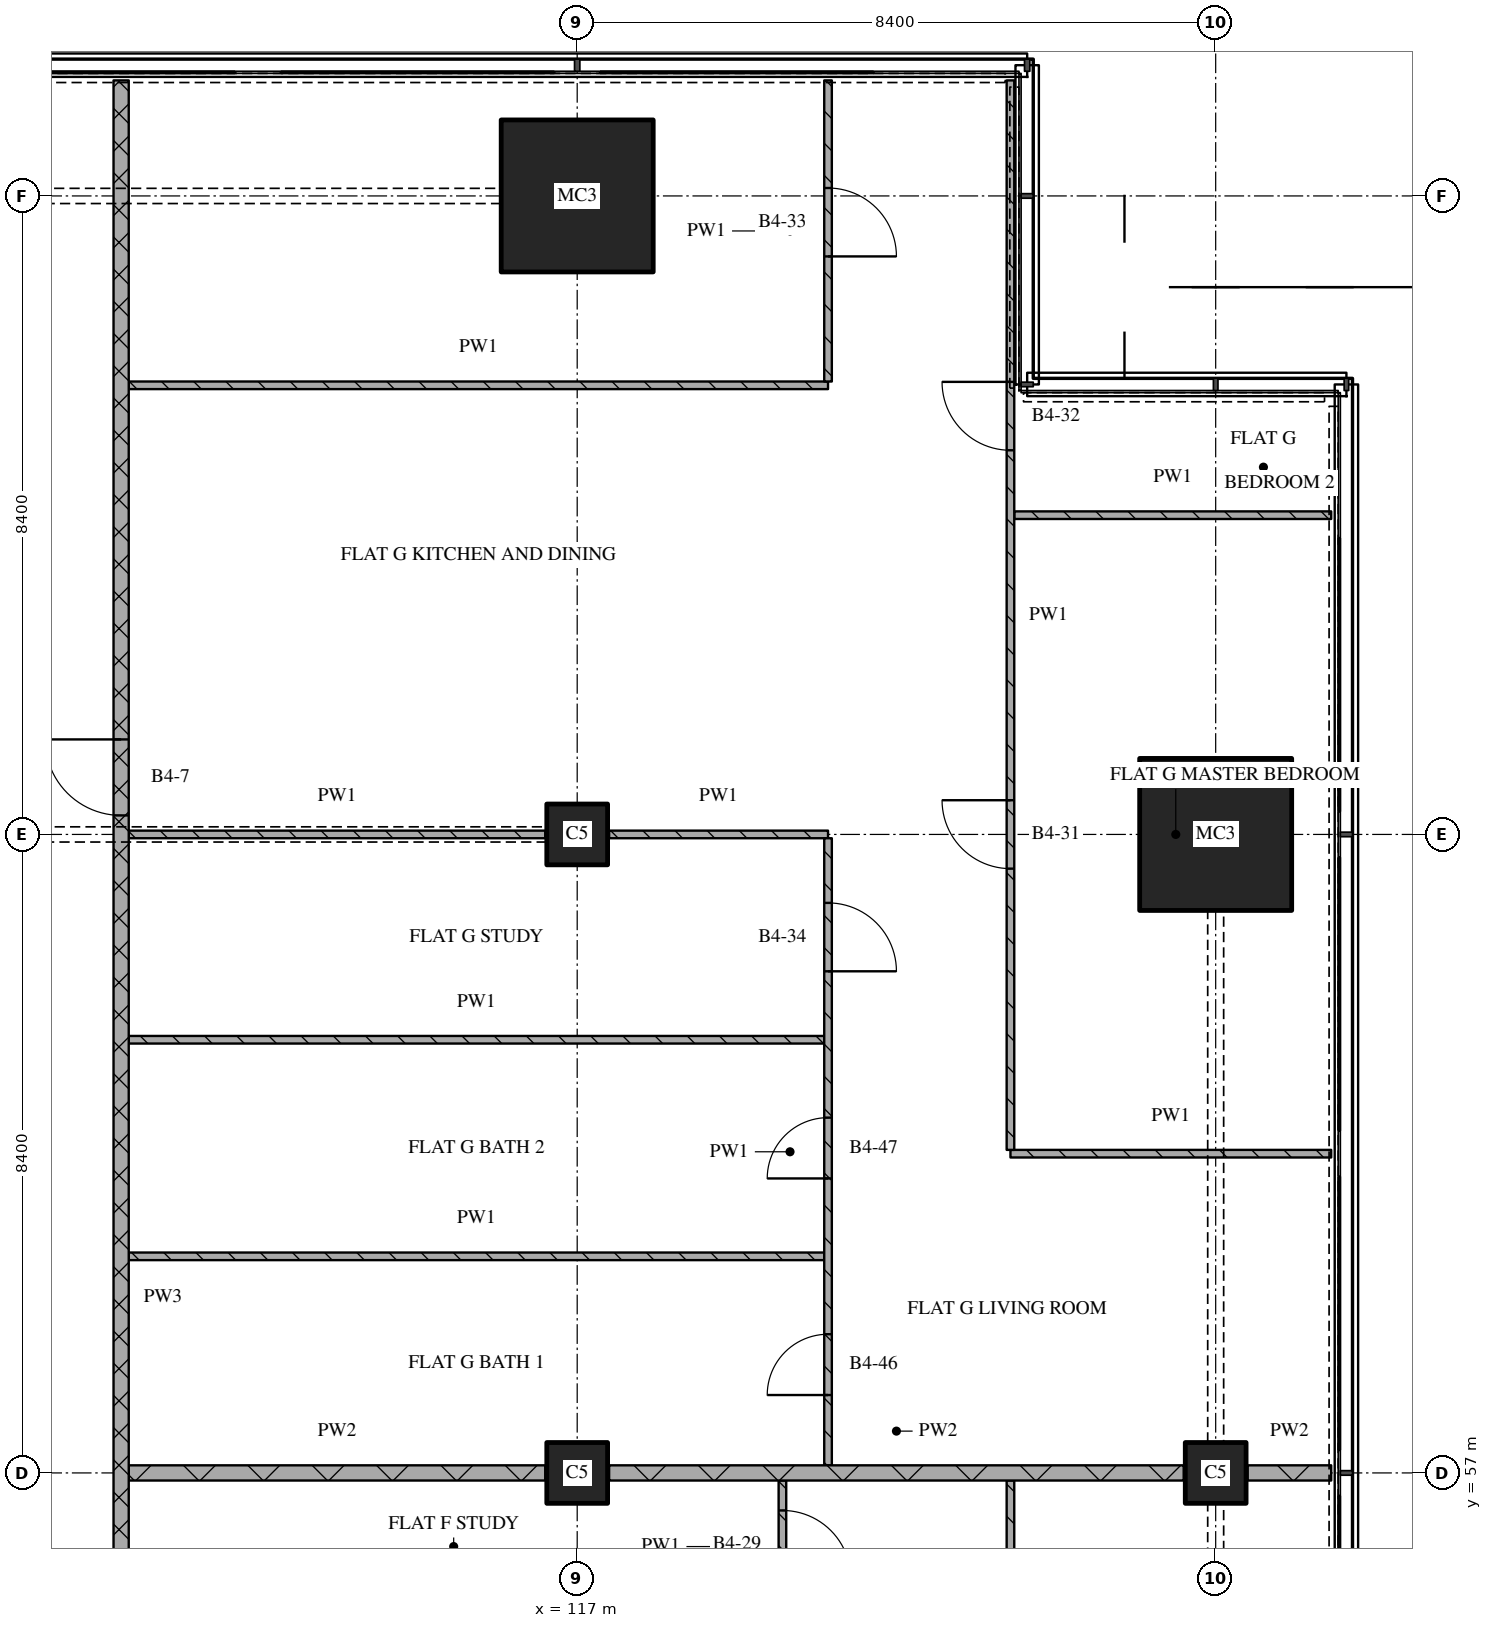
"""IFC4 building model, lengths in metres.
Left out: names, types, materials, properties, quantities, classifications, styles, units other than length and angle.
Written with IfcOpenShell. Run it as: python <this file> out.ifc"""

import sys

from ifc_helpers import new_model, si_unit, direction, frame, frame_2d, origin, origin_2d, place, context, subcontext, project, spatial, rectangle, extrude, element, fill, save


model = new_model("IFC4")
c1 = context("Model", 3, precision=1e-05, world=origin(), true_north=direction((0.0, 1.0)))
c2 = subcontext(c1, "Body", "Model", "MODEL_VIEW")
j1 = project(units=[si_unit("LENGTHUNIT", "METRE"), si_unit("PLANEANGLEUNIT", "RADIAN")], contexts=[c1])
p1 = place(None, origin())
s1 = spatial("IfcSite", under=j1, at=p1, CompositionType="ELEMENT")
p2 = place(p1, origin())
s2 = spatial("IfcBuilding", under=s1, at=p2, CompositionType="ELEMENT")
p3 = place(p2, frame((0.0, 0.0, 134.85)))
s3 = spatial("IfcBuildingStorey", under=s2, at=p3, CompositionType="ELEMENT", Elevation=134.85)
for number, where, z_axis, x_axis in (
    (1, (117.0, 57.0, 0.0), (0.0, 0.0, 1.0), (1.0, 0.0, 0.0)),
    (2, (117.0, 65.4, 0.0), (0.0, 0.0, 1.0), (1.0, 0.0, 0.0)),
):
    element("IfcColumn", number, at=place(p3, frame(where, z_axis=z_axis, x_axis=x_axis)), inside=s3, PredefinedType="COLUMN", context=c2, shape_type="SweptSolid", body=[
        extrude(rectangle(XDim=0.8, YDim=0.8, at=origin_2d()), origin(), (0.0, 0.0, 1.0), 3.6),
    ])
p4 = place(p3, frame((117.0, 73.8, 0.0), z_axis=(0.0, 0.0, 1.0), x_axis=(1.0, 0.0, 0.0)))
e3 = element("IfcColumn", 3, at=p4, inside=s3, PredefinedType="COLUMN", context=c2, shape_type="SweptSolid", body=[
    extrude(rectangle(XDim=2.0, YDim=2.0, at=origin_2d()), origin(), (0.0, 0.0, 1.0), 3.6),
])
p5 = place(p3, frame((125.4, 57.0, 0.0), z_axis=(0.0, 0.0, 1.0), x_axis=(1.0, 0.0, 0.0)))
e4 = element("IfcColumn", 4, at=p5, inside=s3, PredefinedType="COLUMN", context=c2, shape_type="SweptSolid", body=[
    extrude(rectangle(XDim=0.8, YDim=0.8, at=origin_2d()), origin(), (0.0, 0.0, 1.0), 3.6),
])
p6 = place(p3, frame((125.4, 65.4, 0.0), z_axis=(0.0, 0.0, 1.0), x_axis=(1.0, 0.0, 0.0)))
e5 = element("IfcColumn", 5, at=p6, inside=s3, PredefinedType="COLUMN", context=c2, shape_type="SweptSolid", body=[
    extrude(rectangle(XDim=2.0, YDim=2.0, at=origin_2d()), origin(), (0.0, 0.0, 1.0), 3.6),
])
p7 = place(p3, frame((111.1, 57.0, 0.0), z_axis=(0.0, 0.0, 1.0), x_axis=(1.0, 0.0, 0.0)))
e6 = element("IfcWall", 6, at=p7, inside=s3, PredefinedType="PARTITIONING", context=c2, shape_type="SweptSolid", body=[
    extrude(rectangle(XDim=5.48, YDim=0.2, at=frame_2d((2.74, 0.0))), origin(), (0.0, 0.0, 1.0), 3.32),
])
p8 = place(p3, frame((117.42, 57.0, 0.0), z_axis=(0.0, 0.0, 1.0), x_axis=(1.0, 0.0, 0.0)))
e7 = element("IfcWall", 7, at=p8, inside=s3, PredefinedType="PARTITIONING", context=c2, shape_type="SweptSolid", body=[
    extrude(rectangle(XDim=7.56, YDim=0.2, at=frame_2d((3.78, 0.0))), origin(), (0.0, 0.0, 1.0), 3.32),
])
p9 = place(p3, frame((125.82, 57.0, 0.0), z_axis=(0.0, 0.0, 1.0), x_axis=(1.0, 0.0, 0.0)))
e8 = element("IfcWall", 8, at=p9, inside=s3, PredefinedType="PARTITIONING", context=c2, shape_type="SweptSolid", body=[
    extrude(rectangle(XDim=1.1, YDim=0.2, at=frame_2d((0.55, 0.0))), origin(), (0.0, 0.0, 1.0), 3.32),
])
p10 = place(p3, frame((111.1, 59.85, 0.0), z_axis=(0.0, 0.0, 1.0), x_axis=(1.0, 0.0, 0.0)))
e9 = element("IfcWall", 9, at=p10, inside=s3, PredefinedType="PARTITIONING", context=c2, shape_type="SweptSolid", body=[
    extrude(rectangle(XDim=9.15, YDim=0.1, at=frame_2d((4.575, 0.0))), origin(), (0.0, 0.0, 1.0), 3.32),
])
p11 = place(p3, frame((122.7, 61.2, 0.0), z_axis=(0.0, 0.0, 1.0), x_axis=(1.0, 0.0, 0.0)))
e10 = element("IfcWall", 10, at=p11, inside=s3, PredefinedType="PARTITIONING", context=c2, shape_type="SweptSolid", body=[
    extrude(rectangle(XDim=4.22, YDim=0.1, at=frame_2d((2.11, 0.0))), origin(), (0.0, 0.0, 1.0), 3.32),
])
p12 = place(p3, frame((111.1, 62.699, 0.0), z_axis=(0.0, 0.0, 1.0), x_axis=(1.0, 0.0, 0.0)))
e11 = element("IfcWall", 11, at=p12, inside=s3, PredefinedType="PARTITIONING", context=c2, shape_type="SweptSolid", body=[
    extrude(rectangle(XDim=9.15, YDim=0.1, at=frame_2d((4.575, 0.0))), origin(), (0.0, 0.0, 1.0), 3.32),
])
p13 = place(p3, frame((111.1, 65.4, 0.0), z_axis=(0.0, 0.0, 1.0), x_axis=(1.0, 0.0, 0.0)))
e12 = element("IfcWall", 12, at=p13, inside=s3, PredefinedType="PARTITIONING", context=c2, shape_type="SweptSolid", body=[
    extrude(rectangle(XDim=5.48, YDim=0.1, at=frame_2d((2.74, 0.0))), origin(), (0.0, 0.0, 1.0), 2.82),
])
p14 = place(p3, frame((117.42, 65.4, 0.0), z_axis=(0.0, 0.0, 1.0), x_axis=(1.0, 0.0, 0.0)))
e13 = element("IfcWall", 13, at=p14, inside=s3, PredefinedType="PARTITIONING", context=c2, shape_type="SweptSolid", body=[
    extrude(rectangle(XDim=2.88, YDim=0.1, at=frame_2d((1.44, 0.0))), origin(), (0.0, 0.0, 1.0), 3.32),
])
p15 = place(p3, frame((122.75, 69.6, 0.0), z_axis=(0.0, 0.0, 1.0), x_axis=(1.0, 0.0, 0.0)))
e14 = element("IfcWall", 14, at=p15, inside=s3, PredefinedType="PARTITIONING", context=c2, shape_type="SweptSolid", body=[
    extrude(rectangle(XDim=4.17, YDim=0.1, at=frame_2d((2.085, 0.0))), origin(), (0.0, 0.0, 1.0), 3.32),
])
p16 = place(p3, frame((111.1, 71.309, 0.0), z_axis=(0.0, 0.0, 1.0), x_axis=(1.0, 0.0, 0.0)))
e15 = element("IfcWall", 15, at=p16, inside=s3, PredefinedType="PARTITIONING", context=c2, shape_type="SweptSolid", body=[
    extrude(rectangle(XDim=9.2, YDim=0.1, at=frame_2d((4.6, 0.0))), origin(), (0.0, 0.0, 1.0), 3.32),
])
p17 = place(p3, frame((111.0, 75.32, 0.0), z_axis=(0.0, 0.0, 1.0), x_axis=(0.0, -1.0, 0.0)))
e16 = element("IfcWall", 16, at=p17, inside=s3, PredefinedType="PARTITIONING", context=c2, shape_type="SweptSolid", body=[
    extrude(rectangle(XDim=32.02, YDim=0.2, at=frame_2d((16.01, 0.0))), origin(), (0.0, 0.0, 1.0), 3.32),
])
p18 = place(p17, frame((8.67, 0.0, 0.0)))
e17 = element("IfcOpeningElement", 17, at=p18, cuts=e16, PredefinedType="OPENING", context=c2, shape_type="SweptSolid", body=[
    extrude(rectangle(XDim=1.0, YDim=2.1, at=frame_2d((0.5, 1.05))), frame((0.0, 0.11, 0.0), z_axis=(0.0, -1.0, 0.0), x_axis=(1.0, 0.0, 0.0)), (0.0, 0.0, 1.0), 0.22),
])
p19 = place(p17, frame((25.17, 0.0, 0.0)))
e18 = element("IfcOpeningElement", 18, at=p19, cuts=e16, PredefinedType="OPENING", context=c2, shape_type="SweptSolid", body=[
    extrude(rectangle(XDim=1.0, YDim=2.1, at=frame_2d((0.5, 1.05))), frame((0.0, 0.11, 0.0), z_axis=(0.0, -1.0, 0.0), x_axis=(1.0, 0.0, 0.0)), (0.0, 0.0, 1.0), 0.22),
])
p20 = place(p3, frame((119.7, 55.163, 0.0), z_axis=(0.0, 0.0, 1.0), x_axis=(0.0, 1.0, 0.0)))
e19 = element("IfcWall", 19, at=p20, inside=s3, PredefinedType="PARTITIONING", context=c2, shape_type="SweptSolid", body=[
    extrude(rectangle(XDim=1.737, YDim=0.1, at=frame_2d((0.869, 0.0))), origin(), (0.0, 0.0, 1.0), 3.32),
])
p21 = place(p20, frame((0.444, 0.0, 0.0)))
e20 = element("IfcOpeningElement", 20, at=p21, cuts=e19, PredefinedType="OPENING", context=c2, shape_type="SweptSolid", body=[
    extrude(rectangle(XDim=0.9, YDim=2.1, at=frame_2d((0.45, 1.05))), frame((0.0, 0.06, 0.0), z_axis=(0.0, -1.0, 0.0), x_axis=(1.0, 0.0, 0.0)), (0.0, 0.0, 1.0), 0.12),
])
p22 = place(p3, frame((120.3, 57.1, 0.0), z_axis=(0.0, 0.0, 1.0), x_axis=(0.0, 1.0, 0.0)))
e21 = element("IfcWall", 21, at=p22, inside=s3, PredefinedType="PARTITIONING", context=c2, shape_type="SweptSolid", body=[
    extrude(rectangle(XDim=8.25, YDim=0.1, at=frame_2d((4.125, 0.0))), origin(), (0.0, 0.0, 1.0), 3.32),
])
p23 = place(p22, frame((0.925, 0.0, 0.0)))
e22 = element("IfcOpeningElement", 22, at=p23, cuts=e21, PredefinedType="OPENING", context=c2, shape_type="SweptSolid", body=[
    extrude(rectangle(XDim=0.8, YDim=2.1, at=frame_2d((0.4, 1.05))), frame((0.0, 0.06, 0.0), z_axis=(0.0, -1.0, 0.0), x_axis=(1.0, 0.0, 0.0)), (0.0, 0.0, 1.0), 0.12),
])
p24 = place(p22, frame((3.774, 0.0, 0.0)))
e23 = element("IfcOpeningElement", 23, at=p24, cuts=e21, PredefinedType="OPENING", context=c2, shape_type="SweptSolid", body=[
    extrude(rectangle(XDim=0.8, YDim=2.1, at=frame_2d((0.4, 1.05))), frame((0.0, 0.06, 0.0), z_axis=(0.0, -1.0, 0.0), x_axis=(1.0, 0.0, 0.0)), (0.0, 0.0, 1.0), 0.12),
])
p25 = place(p22, frame((6.5, 0.0, 0.0)))
e24 = element("IfcOpeningElement", 24, at=p25, cuts=e21, PredefinedType="OPENING", context=c2, shape_type="SweptSolid", body=[
    extrude(rectangle(XDim=0.9, YDim=2.1, at=frame_2d((0.45, 1.05))), frame((0.0, 0.06, 0.0), z_axis=(0.0, -1.0, 0.0), x_axis=(1.0, 0.0, 0.0)), (0.0, 0.0, 1.0), 0.12),
])
p26 = place(p3, frame((120.3, 71.359, 0.0), z_axis=(0.0, 0.0, 1.0), x_axis=(0.0, 1.0, 0.0)))
e25 = element("IfcWall", 25, at=p26, inside=s3, PredefinedType="PARTITIONING", context=c2, shape_type="SweptSolid", body=[
    extrude(rectangle(XDim=3.961, YDim=0.1, at=frame_2d((1.981, 0.0))), origin(), (0.0, 0.0, 1.0), 3.32),
])
p27 = place(p26, frame((1.646, 0.0, 0.0)))
e26 = element("IfcOpeningElement", 26, at=p27, cuts=e25, PredefinedType="OPENING", context=c2, shape_type="SweptSolid", body=[
    extrude(rectangle(XDim=0.9, YDim=2.1, at=frame_2d((0.45, 1.05))), frame((0.0, 0.06, 0.0), z_axis=(0.0, -1.0, 0.0), x_axis=(1.0, 0.0, 0.0)), (0.0, 0.0, 1.0), 0.12),
])
p28 = place(p3, frame((122.7, 56.9, 0.0), z_axis=(0.0, 0.0, 1.0), x_axis=(0.0, -1.0, 0.0)))
e27 = element("IfcWall", 27, at=p28, inside=s3, PredefinedType="PARTITIONING", context=c2, shape_type="SweptSolid", body=[
    extrude(rectangle(XDim=8.25, YDim=0.1, at=frame_2d((4.125, 0.0))), origin(), (0.0, 0.0, 1.0), 3.32),
])
p29 = place(p28, frame((3.65, 0.0, 0.0)))
e28 = element("IfcOpeningElement", 28, at=p29, cuts=e27, PredefinedType="OPENING", context=c2, shape_type="SweptSolid", body=[
    extrude(rectangle(XDim=0.9, YDim=2.1, at=frame_2d((0.45, 1.05))), frame((0.0, 0.06, 0.0), z_axis=(0.0, -1.0, 0.0), x_axis=(1.0, 0.0, 0.0)), (0.0, 0.0, 1.0), 0.12),
])
p30 = place(p3, frame((122.7, 75.32, 0.0), z_axis=(0.0, 0.0, 1.0), x_axis=(0.0, -1.0, 0.0)))
e29 = element("IfcWall", 29, at=p30, inside=s3, PredefinedType="PARTITIONING", context=c2, shape_type="SweptSolid", body=[
    extrude(rectangle(XDim=14.07, YDim=0.1, at=frame_2d((7.035, 0.0))), origin(), (0.0, 0.0, 1.0), 3.32),
])
p31 = place(p30, frame((3.966, 0.0, 0.0)))
e30 = element("IfcOpeningElement", 30, at=p31, cuts=e29, PredefinedType="OPENING", context=c2, shape_type="SweptSolid", body=[
    extrude(rectangle(XDim=0.9, YDim=2.1, at=frame_2d((0.45, 1.05))), frame((0.0, 0.06, 0.0), z_axis=(0.0, -1.0, 0.0), x_axis=(1.0, 0.0, 0.0)), (0.0, 0.0, 1.0), 0.12),
])
p32 = place(p30, frame((9.47, 0.0, 0.0)))
e31 = element("IfcOpeningElement", 31, at=p32, cuts=e29, PredefinedType="OPENING", context=c2, shape_type="SweptSolid", body=[
    extrude(rectangle(XDim=0.9, YDim=2.1, at=frame_2d((0.45, 1.05))), frame((0.0, 0.06, 0.0), z_axis=(0.0, -1.0, 0.0), x_axis=(1.0, 0.0, 0.0)), (0.0, 0.0, 1.0), 0.12),
])
p33 = place(p18, origin())
e32 = element("IfcDoor", 32, at=p33, inside=s3, OperationType="SINGLE_SWING_RIGHT", PredefinedType="DOOR", context=c2, shape_type="SweptSolid", body=[
    extrude(rectangle(XDim=1.0, YDim=2.1, at=frame_2d((0.5, 1.05))), frame((0.0, 0.025, 0.0), z_axis=(0.0, -1.0, 0.0), x_axis=(1.0, 0.0, 0.0)), (0.0, 0.0, 1.0), 0.05),
])
fill(e17, e32)
p34 = place(p21, origin())
e33 = element("IfcDoor", 33, at=p34, inside=s3, OperationType="SINGLE_SWING_RIGHT", PredefinedType="DOOR", context=c2, shape_type="SweptSolid", body=[
    extrude(rectangle(XDim=0.9, YDim=2.1, at=frame_2d((0.45, 1.05))), frame((0.0, 0.025, 0.0), z_axis=(0.0, -1.0, 0.0), x_axis=(1.0, 0.0, 0.0)), (0.0, 0.0, 1.0), 0.05),
])
fill(e20, e33)
p35 = place(p23, origin())
e34 = element("IfcDoor", 34, at=p35, inside=s3, OperationType="SINGLE_SWING_LEFT", PredefinedType="DOOR", context=c2, shape_type="SweptSolid", body=[
    extrude(rectangle(XDim=0.8, YDim=2.1, at=frame_2d((0.4, 1.05))), frame((0.0, 0.025, 0.0), z_axis=(0.0, -1.0, 0.0), x_axis=(1.0, 0.0, 0.0)), (0.0, 0.0, 1.0), 0.05),
])
fill(e22, e34)
p36 = place(p24, origin())
e35 = element("IfcDoor", 35, at=p36, inside=s3, OperationType="SINGLE_SWING_LEFT", PredefinedType="DOOR", context=c2, shape_type="SweptSolid", body=[
    extrude(rectangle(XDim=0.8, YDim=2.1, at=frame_2d((0.4, 1.05))), frame((0.0, 0.025, 0.0), z_axis=(0.0, -1.0, 0.0), x_axis=(1.0, 0.0, 0.0)), (0.0, 0.0, 1.0), 0.05),
])
fill(e23, e35)
p37 = place(p25, origin())
e36 = element("IfcDoor", 36, at=p37, inside=s3, OperationType="SINGLE_SWING_RIGHT", PredefinedType="DOOR", context=c2, shape_type="SweptSolid", body=[
    extrude(rectangle(XDim=0.9, YDim=2.1, at=frame_2d((0.45, 1.05))), frame((0.0, 0.025, 0.0), z_axis=(0.0, -1.0, 0.0), x_axis=(1.0, 0.0, 0.0)), (0.0, 0.0, 1.0), 0.05),
])
fill(e24, e36)
p38 = place(p27, origin())
e37 = element("IfcDoor", 37, at=p38, inside=s3, OperationType="SINGLE_SWING_RIGHT", PredefinedType="DOOR", context=c2, shape_type="SweptSolid", body=[
    extrude(rectangle(XDim=0.9, YDim=2.1, at=frame_2d((0.45, 1.05))), frame((0.0, 0.025, 0.0), z_axis=(0.0, -1.0, 0.0), x_axis=(1.0, 0.0, 0.0)), (0.0, 0.0, 1.0), 0.05),
])
fill(e26, e37)
p39 = place(p31, origin())
e38 = element("IfcDoor", 38, at=p39, inside=s3, OperationType="SINGLE_SWING_RIGHT", PredefinedType="DOOR", context=c2, shape_type="SweptSolid", body=[
    extrude(rectangle(XDim=0.9, YDim=2.1, at=frame_2d((0.45, 1.05))), frame((0.0, 0.025, 0.0), z_axis=(0.0, -1.0, 0.0), x_axis=(1.0, 0.0, 0.0)), (0.0, 0.0, 1.0), 0.05),
])
fill(e30, e38)
p40 = place(p32, origin())
e39 = element("IfcDoor", 39, at=p40, inside=s3, OperationType="SINGLE_SWING_RIGHT", PredefinedType="DOOR", context=c2, shape_type="SweptSolid", body=[
    extrude(rectangle(XDim=0.9, YDim=2.1, at=frame_2d((0.45, 1.05))), frame((0.0, 0.025, 0.0), z_axis=(0.0, -1.0, 0.0), x_axis=(1.0, 0.0, 0.0)), (0.0, 0.0, 1.0), 0.05),
])
fill(e31, e39)
save(model, sys.argv[1])
